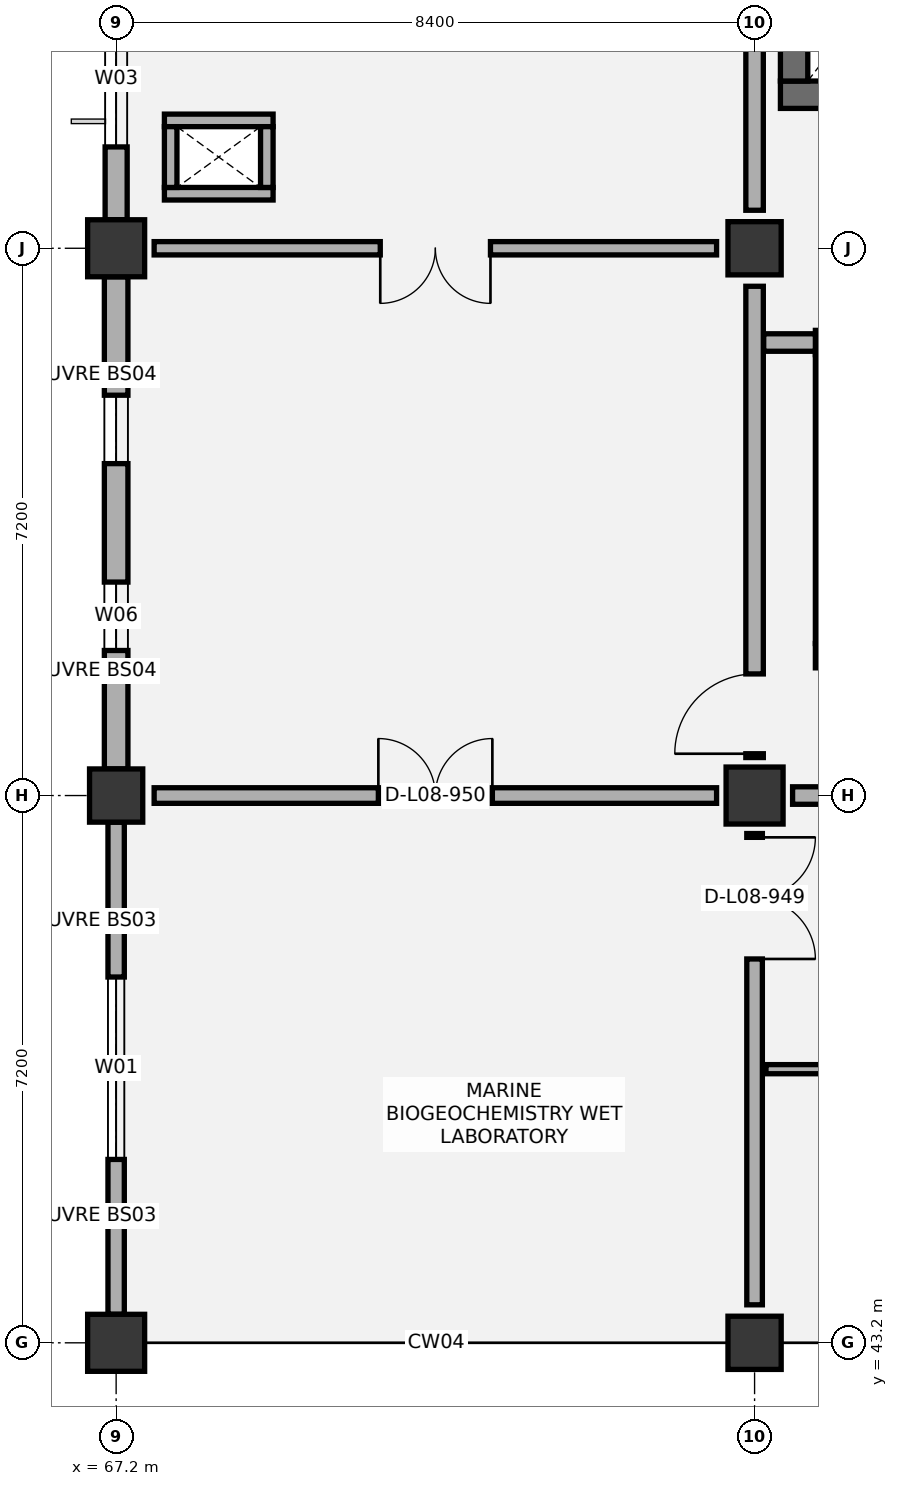
"""IFC4 building model, lengths in metres.
Left out: names, types, materials, properties, quantities, classifications, styles, units other than length and angle.
Written with IfcOpenShell. Run it as: python <this file> out.ifc"""

import sys

from ifc_helpers import new_model, si_unit, direction, frame, frame_2d, origin, origin_2d, place, context, subcontext, project, spatial, rectangle, extrude, element, fill, save


model = new_model("IFC4")
c1 = context("Model", 3, precision=1e-05, world=origin(), true_north=direction((0.0, 1.0)))
c2 = subcontext(c1, "Body", "Model", "MODEL_VIEW")
j1 = project(units=[si_unit("LENGTHUNIT", "METRE"), si_unit("PLANEANGLEUNIT", "RADIAN")], contexts=[c1])
p1 = place(None, origin())
s1 = spatial("IfcSite", under=j1, at=p1, CompositionType="ELEMENT")
p2 = place(p1, origin())
s2 = spatial("IfcBuilding", under=s1, at=p2, CompositionType="ELEMENT")
p3 = place(p2, frame((0.0, 0.0, 39.6)))
s3 = spatial("IfcBuildingStorey", under=s2, at=p3, CompositionType="ELEMENT", Elevation=39.6)
p4 = place(p3, frame((67.2, 43.2, 0.0), z_axis=(0.0, 0.0, 1.0), x_axis=(1.0, 0.0, 0.0)))
e1 = element("IfcColumn", 1, at=p4, inside=s3, PredefinedType="COLUMN", context=c2, shape_type="SweptSolid", body=[
    extrude(rectangle(XDim=0.75, YDim=0.75, at=origin_2d()), origin(), (0.0, 0.0, 1.0), 4.2),
])
p5 = place(p3, frame((67.2, 50.4, 0.0), z_axis=(0.0, 0.0, 1.0), x_axis=(1.0, 0.0, 0.0)))
e2 = element("IfcColumn", 2, at=p5, inside=s3, PredefinedType="COLUMN", context=c2, shape_type="SweptSolid", body=[
    extrude(rectangle(XDim=0.7, YDim=0.7, at=origin_2d()), origin(), (0.0, 0.0, 1.0), 4.2),
])
p6 = place(p3, frame((67.2, 57.6, 0.0), z_axis=(0.0, 0.0, 1.0), x_axis=(1.0, 0.0, 0.0)))
e3 = element("IfcColumn", 3, at=p6, inside=s3, PredefinedType="COLUMN", context=c2, shape_type="SweptSolid", body=[
    extrude(rectangle(XDim=0.75, YDim=0.75, at=origin_2d()), origin(), (0.0, 0.0, 1.0), 4.2),
])
p7 = place(p3, frame((75.6, 43.2, 0.0), z_axis=(0.0, 0.0, 1.0), x_axis=(1.0, 0.0, 0.0)))
e4 = element("IfcColumn", 4, at=p7, inside=s3, PredefinedType="COLUMN", context=c2, shape_type="SweptSolid", body=[
    extrude(rectangle(XDim=0.7, YDim=0.7, at=origin_2d()), origin(), (0.0, 0.0, 1.0), 4.2),
])
p8 = place(p3, frame((75.6, 50.4, 0.0), z_axis=(0.0, 0.0, 1.0), x_axis=(1.0, 0.0, 0.0)))
e5 = element("IfcColumn", 5, at=p8, inside=s3, PredefinedType="COLUMN", context=c2, shape_type="SweptSolid", body=[
    extrude(rectangle(XDim=0.75, YDim=0.75, at=origin_2d()), origin(), (0.0, 0.0, 1.0), 4.2),
])
p9 = place(p3, frame((75.6, 57.6, 0.0), z_axis=(0.0, 0.0, 1.0), x_axis=(1.0, 0.0, 0.0)))
e6 = element("IfcColumn", 6, at=p9, inside=s3, PredefinedType="COLUMN", context=c2, shape_type="SweptSolid", body=[
    extrude(rectangle(XDim=0.7, YDim=0.7, at=origin_2d()), origin(), (0.0, 0.0, 1.0), 4.2),
])
p10 = place(p3, frame((76.4, 52.24, 0.0), z_axis=(0.0, 0.0, 1.0), x_axis=(1.0, 0.0, 0.0)))
e7 = element("IfcWall", 7, at=p10, inside=s3, PredefinedType="SHEAR", context=c2, shape_type="SweptSolid", body=[
    extrude(rectangle(XDim=7.48, YDim=0.32, at=frame_2d((3.74, 0.0))), origin(), (0.0, 0.0, 1.0), 3.9),
])
p11 = place(p10, frame((0.45, 0.0, 0.0)))
e8 = element("IfcOpeningElement", 8, at=p11, cuts=e7, PredefinedType="OPENING", context=c2, shape_type="SweptSolid", body=[
    extrude(rectangle(XDim=1.05, YDim=2.15, at=frame_2d((0.525, 1.075))), frame((0.0, 0.17, 0.0), z_axis=(0.0, -1.0, 0.0), x_axis=(1.0, 0.0, 0.0)), (0.0, 0.0, 1.0), 0.34),
])
p12 = place(p3, frame((76.4, 56.36, 0.0), z_axis=(0.0, 0.0, 1.0), x_axis=(1.0, 0.0, 0.0)))
e9 = element("IfcWall", 9, at=p12, inside=s3, PredefinedType="SHEAR", context=c2, shape_type="SweptSolid", body=[
    extrude(rectangle(XDim=7.48, YDim=0.32, at=frame_2d((3.74, 0.0))), origin(), (0.0, 0.0, 1.0), 3.9),
])
p13 = place(p3, frame((76.56, 52.4, 0.0), z_axis=(0.0, 0.0, 1.0), x_axis=(0.0, 1.0, 0.0)))
e10 = element("IfcWall", 10, at=p13, inside=s3, PredefinedType="SHEAR", context=c2, shape_type="SweptSolid", body=[
    extrude(rectangle(XDim=3.8, YDim=0.32, at=frame_2d((1.9, 0.0))), origin(), (0.0, 0.0, 1.0), 3.9),
])
p14 = place(p3, frame((75.94, 59.62, 0.0), z_axis=(0.0, 0.0, 1.0), x_axis=(1.0, 0.0, 0.0)))
e11 = element("IfcWall", 11, at=p14, inside=s3, PredefinedType="SHEAR", context=c2, shape_type="SweptSolid", body=[
    extrude(rectangle(XDim=2.87, YDim=0.36, at=frame_2d((1.435, 0.0))), origin(), (0.0, 0.0, 1.0), 3.9),
])
p15 = place(p14, frame((0.76, 0.0, 0.0)))
e12 = element("IfcOpeningElement", 12, at=p15, cuts=e11, PredefinedType="OPENING", context=c2, shape_type="SweptSolid", body=[
    extrude(rectangle(XDim=1.35, YDim=2.2, at=frame_2d((0.675, 1.1))), frame((0.0, 0.19, 0.0), z_axis=(0.0, -1.0, 0.0), x_axis=(1.0, 0.0, 0.0)), (0.0, 0.0, 1.0), 0.38),
])
p16 = place(p3, frame((76.12, 59.8, 0.0), z_axis=(0.0, 0.0, 1.0), x_axis=(0.0, 1.0, 0.0)))
e13 = element("IfcWall", 13, at=p16, inside=s3, PredefinedType="SHEAR", context=c2, shape_type="SweptSolid", body=[
    extrude(rectangle(XDim=2.8, YDim=0.36, at=frame_2d((1.4, 0.0))), origin(), (0.0, 0.0, 1.0), 3.9),
])
p17 = place(p3, frame((67.2, 43.575, 0.0), z_axis=(0.0, 0.0, 1.0), x_axis=(0.0, 1.0, 0.0)))
e14 = element("IfcWall", 14, at=p17, inside=s3, PredefinedType="SOLIDWALL", context=c2, shape_type="SweptSolid", body=[
    extrude(rectangle(XDim=6.475, YDim=0.215, at=frame_2d((3.238, 0.0))), origin(), (0.0, 0.0, 1.0), 3.295),
])
p18 = place(p17, frame((2.038, 0.0, 0.9)))
e15 = element("IfcOpeningElement", 15, at=p18, cuts=e14, PredefinedType="OPENING", context=c2, shape_type="SweptSolid", body=[
    extrude(rectangle(XDim=2.4, YDim=1.8, at=frame_2d((1.2, 0.9))), frame((0.0, 0.117, 0.0), z_axis=(0.0, -1.0, 0.0), x_axis=(1.0, 0.0, 0.0)), (0.0, 0.0, 1.0), 0.235),
])
p19 = place(p3, frame((67.2, 50.75, 0.0), z_axis=(0.0, 0.0, 1.0), x_axis=(0.0, 1.0, 0.0)))
e16 = element("IfcWall", 16, at=p19, inside=s3, PredefinedType="SOLIDWALL", context=c2, shape_type="SweptSolid", body=[
    extrude(rectangle(XDim=6.475, YDim=0.31, at=frame_2d((3.238, 0.0))), origin(), (0.0, 0.0, 1.0), 3.295),
])
p20 = place(p19, frame((1.558, 0.0, 0.9)))
e17 = element("IfcOpeningElement", 17, at=p20, cuts=e16, PredefinedType="OPENING", context=c2, shape_type="SweptSolid", body=[
    extrude(rectangle(XDim=0.9, YDim=1.8, at=frame_2d((0.45, 0.9))), frame((0.0, 0.165, 0.0), z_axis=(0.0, -1.0, 0.0), x_axis=(1.0, 0.0, 0.0)), (0.0, 0.0, 1.0), 0.33),
])
p21 = place(p19, frame((4.017, 0.0, 0.9)))
e18 = element("IfcOpeningElement", 18, at=p21, cuts=e16, PredefinedType="OPENING", context=c2, shape_type="SweptSolid", body=[
    extrude(rectangle(XDim=0.9, YDim=1.8, at=frame_2d((0.45, 0.9))), frame((0.0, 0.165, 0.0), z_axis=(0.0, -1.0, 0.0), x_axis=(1.0, 0.0, 0.0)), (0.0, 0.0, 1.0), 0.33),
])
p22 = place(p3, frame((67.2, 57.975, 0.0), z_axis=(0.0, 0.0, 1.0), x_axis=(0.0, 1.0, 0.0)))
e19 = element("IfcWall", 19, at=p22, inside=s3, PredefinedType="SOLIDWALL", context=c2, shape_type="SweptSolid", body=[
    extrude(rectangle(XDim=6.475, YDim=0.29, at=frame_2d((3.237, 0.0))), origin(), (0.0, 0.0, 1.0), 3.295),
])
p23 = place(p22, frame((0.958, 0.0, 0.9)))
e20 = element("IfcOpeningElement", 20, at=p23, cuts=e19, PredefinedType="OPENING", context=c2, shape_type="SweptSolid", body=[
    extrude(rectangle(XDim=1.8, YDim=1.8, at=frame_2d((0.9, 0.9))), frame((0.0, 0.155, 0.0), z_axis=(0.0, -1.0, 0.0), x_axis=(1.0, 0.0, 0.0)), (0.0, 0.0, 1.0), 0.31),
])
p24 = place(p22, frame((3.717, 0.0, 0.9)))
e21 = element("IfcOpeningElement", 21, at=p24, cuts=e19, PredefinedType="OPENING", context=c2, shape_type="SweptSolid", body=[
    extrude(rectangle(XDim=1.8, YDim=1.8, at=frame_2d((0.9, 0.9))), frame((0.0, 0.155, 0.0), z_axis=(0.0, -1.0, 0.0), x_axis=(1.0, 0.0, 0.0)), (0.0, 0.0, 1.0), 0.31),
])
for number, where, z_axis, x_axis in (
    (22, (67.835, 58.317, 0.0), (0.0, 0.0, 1.0), (1.0, 0.0, 0.0)),
    (23, (67.835, 59.282, 0.0), (0.0, 0.0, 1.0), (1.0, 0.0, 0.0)),
):
    element("IfcWall", number, at=place(p3, frame(where, z_axis=z_axis, x_axis=x_axis)), inside=s3, PredefinedType="PARTITIONING", context=c2, shape_type="SweptSolid", body=[
        extrude(rectangle(XDim=1.43, YDim=0.165, at=frame_2d((0.715, 0.0))), origin(), (0.0, 0.0, 1.0), 3.85),
    ])
for number, where, z_axis, x_axis in (
    (24, (67.917, 58.4, 0.0), (0.0, 0.0, 1.0), (0.0, 1.0, 0.0)),
    (25, (69.183, 58.4, 0.0), (0.0, 0.0, 1.0), (0.0, 1.0, 0.0)),
):
    element("IfcWall", number, at=place(p3, frame(where, z_axis=z_axis, x_axis=x_axis)), inside=s3, PredefinedType="PARTITIONING", context=c2, shape_type="SweptSolid", body=[
        extrude(rectangle(XDim=0.8, YDim=0.165, at=frame_2d((0.4, 0.0))), origin(), (0.0, 0.0, 1.0), 3.85),
    ])
p25 = place(p3, frame((75.75, 46.8, 0.0), z_axis=(0.0, 0.0, 1.0), x_axis=(1.0, 0.0, 0.0)))
e26 = element("IfcWall", 26, at=p25, inside=s3, PredefinedType="PARTITIONING", context=c2, shape_type="SweptSolid", body=[
    extrude(rectangle(XDim=8.1, YDim=0.12, at=frame_2d((4.05, 0.0))), origin(), (0.0, 0.0, 1.0), 3.9),
])
p26 = place(p25, frame((3.55, 0.0, 0.0)))
e27 = element("IfcOpeningElement", 27, at=p26, cuts=e26, PredefinedType="OPENING", context=c2, shape_type="SweptSolid", body=[
    extrude(rectangle(XDim=1.6, YDim=2.2, at=frame_2d((0.8, 1.1))), frame((0.0, 0.07, 0.0), z_axis=(0.0, -1.0, 0.0), x_axis=(1.0, 0.0, 0.0)), (0.0, 0.0, 1.0), 0.14),
])
p27 = place(p3, frame((75.6, 43.7, 0.0), z_axis=(0.0, 0.0, 1.0), x_axis=(0.0, 1.0, 0.0)))
e28 = element("IfcWall", 28, at=p27, inside=s3, PredefinedType="PARTITIONING", context=c2, shape_type="SweptSolid", body=[
    extrude(rectangle(XDim=6.2, YDim=0.205, at=frame_2d((3.1, 0.0))), origin(), (0.0, 0.0, 1.0), 3.295),
])
p28 = place(p27, frame((4.55, 0.0, 0.0)))
e29 = element("IfcOpeningElement", 29, at=p28, cuts=e28, PredefinedType="OPENING", context=c2, shape_type="SweptSolid", body=[
    extrude(rectangle(XDim=1.6, YDim=2.2, at=frame_2d((0.8, 1.1))), frame((0.0, 0.113, 0.0), z_axis=(0.0, -1.0, 0.0), x_axis=(1.0, 0.0, 0.0)), (0.0, 0.0, 1.0), 0.225),
])
p29 = place(p3, frame((67.7, 50.4, 0.0), z_axis=(0.0, 0.0, 1.0), x_axis=(1.0, 0.0, 0.0)))
e30 = element("IfcWall", 30, at=p29, inside=s3, PredefinedType="PARTITIONING", context=c2, shape_type="SweptSolid", body=[
    extrude(rectangle(XDim=7.4, YDim=0.205, at=frame_2d((3.7, 0.0))), origin(), (0.0, 0.0, 1.0), 3.245),
])
p30 = place(p29, frame((2.95, 0.0, 0.0)))
e31 = element("IfcOpeningElement", 31, at=p30, cuts=e30, PredefinedType="OPENING", context=c2, shape_type="SweptSolid", body=[
    extrude(rectangle(XDim=1.5, YDim=2.2, at=frame_2d((0.75, 1.1))), frame((0.0, 0.113, 0.0), z_axis=(0.0, -1.0, 0.0), x_axis=(1.0, 0.0, 0.0)), (0.0, 0.0, 1.0), 0.225),
])
p31 = place(p3, frame((75.6, 50.9, 0.0), z_axis=(0.0, 0.0, 1.0), x_axis=(0.0, 1.0, 0.0)))
e32 = element("IfcWall", 32, at=p31, inside=s3, PredefinedType="PARTITIONING", context=c2, shape_type="SweptSolid", body=[
    extrude(rectangle(XDim=6.2, YDim=0.23, at=frame_2d((3.1, 0.0))), origin(), (0.0, 0.0, 1.0), 3.445),
])
p32 = place(p31, frame((0.05, 0.0, 0.0)))
e33 = element("IfcOpeningElement", 33, at=p32, cuts=e32, PredefinedType="OPENING", context=c2, shape_type="SweptSolid", body=[
    extrude(rectangle(XDim=1.05, YDim=2.15, at=frame_2d((0.525, 1.075))), frame((0.0, 0.125, 0.0), z_axis=(0.0, -1.0, 0.0), x_axis=(1.0, 0.0, 0.0)), (0.0, 0.0, 1.0), 0.25),
])
p33 = place(p3, frame((67.7, 57.6, 0.0), z_axis=(0.0, 0.0, 1.0), x_axis=(1.0, 0.0, 0.0)))
e34 = element("IfcWall", 34, at=p33, inside=s3, PredefinedType="PARTITIONING", context=c2, shape_type="SweptSolid", body=[
    extrude(rectangle(XDim=7.4, YDim=0.175, at=frame_2d((3.7, 0.0))), origin(), (0.0, 0.0, 1.0), 3.245),
])
p34 = place(p33, frame((2.975, 0.0, 0.0)))
e35 = element("IfcOpeningElement", 35, at=p34, cuts=e34, PredefinedType="OPENING", context=c2, shape_type="SweptSolid", body=[
    extrude(rectangle(XDim=1.45, YDim=2.2, at=frame_2d((0.725, 1.1))), frame((0.0, 0.097, 0.0), z_axis=(0.0, -1.0, 0.0), x_axis=(1.0, 0.0, 0.0)), (0.0, 0.0, 1.0), 0.195),
])
p35 = place(p3, frame((75.6, 58.1, 0.0), z_axis=(0.0, 0.0, 1.0), x_axis=(0.0, 1.0, 0.0)))
e36 = element("IfcWall", 36, at=p35, inside=s3, PredefinedType="PARTITIONING", context=c2, shape_type="SweptSolid", body=[
    extrude(rectangle(XDim=6.2, YDim=0.23, at=frame_2d((3.1, 0.0))), origin(), (0.0, 0.0, 1.0), 3.295),
])
p36 = place(p3, frame((76.1, 50.4, 0.0), z_axis=(0.0, 0.0, 1.0), x_axis=(1.0, 0.0, 0.0)))
e37 = element("IfcWall", 37, at=p36, inside=s3, PredefinedType="PARTITIONING", context=c2, shape_type="SweptSolid", body=[
    extrude(rectangle(XDim=7.4, YDim=0.23, at=frame_2d((3.7, 0.0))), origin(), (0.0, 0.0, 1.0), 3.295),
])
p37 = place(p36, frame((2.95, 0.0, 0.0)))
e38 = element("IfcOpeningElement", 38, at=p37, cuts=e37, PredefinedType="OPENING", context=c2, shape_type="SweptSolid", body=[
    extrude(rectangle(XDim=1.5, YDim=2.15, at=frame_2d((0.75, 1.075))), frame((0.0, 0.125, 0.0), z_axis=(0.0, -1.0, 0.0), x_axis=(1.0, 0.0, 0.0)), (0.0, 0.0, 1.0), 0.25),
])
p38 = place(p3, frame((75.72, 56.36, 0.0), z_axis=(0.0, 0.0, 1.0), x_axis=(1.0, 0.0, 0.0)))
e39 = element("IfcWall", 39, at=p38, inside=s3, PredefinedType="PARTITIONING", context=c2, shape_type="SweptSolid", body=[
    extrude(rectangle(XDim=0.68, YDim=0.23, at=frame_2d((0.34, 0.0))), origin(), (0.0, 0.0, 1.0), 3.9),
])
p39 = place(p18, origin())
e40 = element("IfcWindow", 40, at=p39, inside=s3, PartitioningType="SINGLE_PANEL", PredefinedType="WINDOW", context=c2, shape_type="SweptSolid", body=[
    extrude(rectangle(XDim=2.4, YDim=1.8, at=frame_2d((1.2, 0.9))), frame((0.0, 0.03, 0.0), z_axis=(0.0, -1.0, 0.0), x_axis=(1.0, 0.0, 0.0)), (0.0, 0.0, 1.0), 0.06),
])
fill(e15, e40)
p40 = place(p20, origin())
e41 = element("IfcWindow", 41, at=p40, inside=s3, PartitioningType="SINGLE_PANEL", PredefinedType="WINDOW", context=c2, shape_type="SweptSolid", body=[
    extrude(rectangle(XDim=0.9, YDim=1.8, at=frame_2d((0.45, 0.9))), frame((0.0, 0.03, 0.0), z_axis=(0.0, -1.0, 0.0), x_axis=(1.0, 0.0, 0.0)), (0.0, 0.0, 1.0), 0.06),
])
fill(e17, e41)
p41 = place(p21, origin())
e42 = element("IfcWindow", 42, at=p41, inside=s3, PartitioningType="SINGLE_PANEL", PredefinedType="WINDOW", context=c2, shape_type="SweptSolid", body=[
    extrude(rectangle(XDim=0.9, YDim=1.8, at=frame_2d((0.45, 0.9))), frame((0.0, 0.03, 0.0), z_axis=(0.0, -1.0, 0.0), x_axis=(1.0, 0.0, 0.0)), (0.0, 0.0, 1.0), 0.06),
])
fill(e18, e42)
p42 = place(p23, origin())
e43 = element("IfcWindow", 43, at=p42, inside=s3, PartitioningType="SINGLE_PANEL", PredefinedType="WINDOW", context=c2, shape_type="SweptSolid", body=[
    extrude(rectangle(XDim=1.8, YDim=1.8, at=frame_2d((0.9, 0.9))), frame((0.0, 0.03, 0.0), z_axis=(0.0, -1.0, 0.0), x_axis=(1.0, 0.0, 0.0)), (0.0, 0.0, 1.0), 0.06),
])
fill(e20, e43)
p43 = place(p28, frame((1.6, 0.0, 0.0), z_axis=(0.0, 0.0, 1.0), x_axis=(-1.0, 0.0, 0.0)))
e44 = element("IfcDoor", 44, at=p43, inside=s3, OperationType="DOUBLE_DOOR_SINGLE_SWING", PredefinedType="DOOR", context=c2, shape_type="SweptSolid", body=[
    extrude(rectangle(XDim=1.6, YDim=2.2, at=frame_2d((0.8, 1.1))), frame((0.0, 0.025, 0.0), z_axis=(0.0, -1.0, 0.0), x_axis=(1.0, 0.0, 0.0)), (0.0, 0.0, 1.0), 0.05),
])
fill(e29, e44)
p44 = place(p30, origin())
e45 = element("IfcDoor", 45, at=p44, inside=s3, OperationType="DOUBLE_DOOR_SINGLE_SWING", PredefinedType="DOOR", context=c2, shape_type="SweptSolid", body=[
    extrude(rectangle(XDim=1.5, YDim=2.2, at=frame_2d((0.75, 1.1))), frame((0.0, 0.025, 0.0), z_axis=(0.0, -1.0, 0.0), x_axis=(1.0, 0.0, 0.0)), (0.0, 0.0, 1.0), 0.05),
])
fill(e31, e45)
p45 = place(p32, origin())
e46 = element("IfcDoor", 46, at=p45, inside=s3, OperationType="SINGLE_SWING_LEFT", PredefinedType="DOOR", context=c2, shape_type="SweptSolid", body=[
    extrude(rectangle(XDim=1.05, YDim=2.15, at=frame_2d((0.525, 1.075))), frame((0.0, 0.025, 0.0), z_axis=(0.0, -1.0, 0.0), x_axis=(1.0, 0.0, 0.0)), (0.0, 0.0, 1.0), 0.05),
])
fill(e33, e46)
p46 = place(p34, frame((1.45, 0.0, 0.0), z_axis=(0.0, 0.0, 1.0), x_axis=(-1.0, 0.0, 0.0)))
e47 = element("IfcDoor", 47, at=p46, inside=s3, OperationType="DOUBLE_DOOR_SINGLE_SWING", PredefinedType="DOOR", context=c2, shape_type="SweptSolid", body=[
    extrude(rectangle(XDim=1.45, YDim=2.2, at=frame_2d((0.725, 1.1))), frame((0.0, 0.025, 0.0), z_axis=(0.0, -1.0, 0.0), x_axis=(1.0, 0.0, 0.0)), (0.0, 0.0, 1.0), 0.05),
])
fill(e35, e47)
save(model, sys.argv[1])
